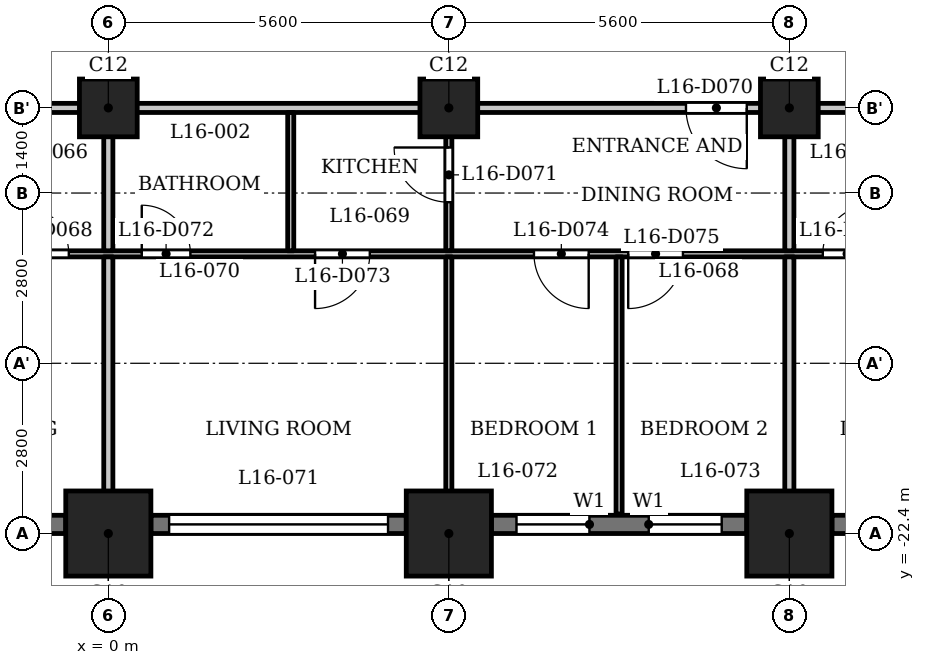
"""IFC4 building model, lengths in metres.
Left out: names, types, materials, properties, quantities, classifications, styles, units other than length and angle.
Written with IfcOpenShell. Run it as: python <this file> out.ifc"""

import sys

from ifc_helpers import new_model, si_unit, direction, frame, frame_2d, origin, origin_2d, place, context, subcontext, project, spatial, rectangle, extrude, element, fill, save


model = new_model("IFC4")
c1 = context("Model", 3, precision=1e-05, world=origin(), true_north=direction((0.0, 1.0)))
c2 = subcontext(c1, "Body", "Model", "MODEL_VIEW")
j1 = project(units=[si_unit("LENGTHUNIT", "METRE"), si_unit("PLANEANGLEUNIT", "RADIAN")], contexts=[c1])
p1 = place(None, origin())
s1 = spatial("IfcSite", under=j1, at=p1, CompositionType="ELEMENT")
p2 = place(p1, origin())
s2 = spatial("IfcBuilding", under=s1, at=p2, CompositionType="ELEMENT")
p3 = place(p2, frame((0.0, 0.0, 65.5)))
s3 = spatial("IfcBuildingStorey", under=s2, at=p3, CompositionType="ELEMENT", Elevation=65.5)
for number, where, z_axis, x_axis in (
    (1, (0.0, -22.4, 0.0), (0.0, 0.0, 1.0), (1.0, 0.0, 0.0)),
    (2, (5.6, -22.4, 0.0), (0.0, 0.0, 1.0), (1.0, 0.0, 0.0)),
    (3, (11.2, -22.4, 0.0), (0.0, 0.0, 1.0), (1.0, 0.0, 0.0)),
):
    element("IfcColumn", number, at=place(p3, frame(where, z_axis=z_axis, x_axis=x_axis)), inside=s3, PredefinedType="COLUMN", context=c2, shape_type="SweptSolid", body=[
        extrude(rectangle(XDim=1.4, YDim=1.4, at=origin_2d()), origin(), (0.0, 0.0, 1.0), 3.5),
    ])
for number, where, z_axis, x_axis in (
    (4, (0.0, -15.4, 0.0), (0.0, 0.0, 1.0), (1.0, 0.0, 0.0)),
    (5, (5.6, -15.4, 0.0), (0.0, 0.0, 1.0), (1.0, 0.0, 0.0)),
    (6, (11.2, -15.4, 0.0), (0.0, 0.0, 1.0), (1.0, 0.0, 0.0)),
):
    element("IfcColumn", number, at=place(p3, frame(where, z_axis=z_axis, x_axis=x_axis)), inside=s3, PredefinedType="COLUMN", context=c2, shape_type="SweptSolid", body=[
        extrude(rectangle(XDim=0.95, YDim=0.95, at=origin_2d()), origin(), (0.0, 0.0, 1.0), 3.5),
    ])
p4 = place(p3, frame((-4.9, -22.25, 0.0), z_axis=(0.0, 0.0, 1.0), x_axis=(1.0, 0.0, 0.0)))
e7 = element("IfcWall", 7, at=p4, inside=s3, PredefinedType="SOLIDWALL", context=c2, shape_type="SweptSolid", body=[
    extrude(rectangle(XDim=4.2, YDim=0.3, at=frame_2d((2.1, 0.0))), origin(), (0.0, 0.0, 1.0), 2.35),
])
p5 = place(p4, frame((0.3, 0.0, 1.2)))
e8 = element("IfcOpeningElement", 8, at=p5, cuts=e7, PredefinedType="OPENING", context=c2, shape_type="SweptSolid", body=[
    extrude(rectangle(XDim=3.6, YDim=0.95, at=frame_2d((1.8, 0.475))), frame((0.0, 0.16, 0.0), z_axis=(0.0, -1.0, 0.0), x_axis=(1.0, 0.0, 0.0)), (0.0, 0.0, 1.0), 0.32),
])
p6 = place(p3, frame((0.7, -22.25, 0.0), z_axis=(0.0, 0.0, 1.0), x_axis=(1.0, 0.0, 0.0)))
e9 = element("IfcWall", 9, at=p6, inside=s3, PredefinedType="SOLIDWALL", context=c2, shape_type="SweptSolid", body=[
    extrude(rectangle(XDim=4.2, YDim=0.3, at=frame_2d((2.1, 0.0))), origin(), (0.0, 0.0, 1.0), 2.35),
])
p7 = place(p6, frame((0.3, 0.0, 1.2)))
e10 = element("IfcOpeningElement", 10, at=p7, cuts=e9, PredefinedType="OPENING", context=c2, shape_type="SweptSolid", body=[
    extrude(rectangle(XDim=3.6, YDim=0.95, at=frame_2d((1.8, 0.475))), frame((0.0, 0.16, 0.0), z_axis=(0.0, -1.0, 0.0), x_axis=(1.0, 0.0, 0.0)), (0.0, 0.0, 1.0), 0.32),
])
p8 = place(p3, frame((6.3, -22.25, 0.0), z_axis=(0.0, 0.0, 1.0), x_axis=(1.0, 0.0, 0.0)))
e11 = element("IfcWall", 11, at=p8, inside=s3, PredefinedType="SOLIDWALL", context=c2, shape_type="SweptSolid", body=[
    extrude(rectangle(XDim=4.2, YDim=0.3, at=frame_2d((2.1, 0.0))), origin(), (0.0, 0.0, 1.0), 2.35),
])
p9 = place(p8, frame((0.413, 0.0, 0.6)))
e12 = element("IfcOpeningElement", 12, at=p9, cuts=e11, PredefinedType="OPENING", context=c2, shape_type="SweptSolid", body=[
    extrude(rectangle(XDim=1.2, YDim=1.55, at=frame_2d((0.6, 0.775))), frame((0.0, 0.16, 0.0), z_axis=(0.0, -1.0, 0.0), x_axis=(1.0, 0.0, 0.0)), (0.0, 0.0, 1.0), 0.32),
])
p10 = place(p8, frame((2.587, 0.0, 0.6)))
e13 = element("IfcOpeningElement", 13, at=p10, cuts=e11, PredefinedType="OPENING", context=c2, shape_type="SweptSolid", body=[
    extrude(rectangle(XDim=1.2, YDim=1.55, at=frame_2d((0.6, 0.775))), frame((0.0, 0.16, 0.0), z_axis=(0.0, -1.0, 0.0), x_axis=(1.0, 0.0, 0.0)), (0.0, 0.0, 1.0), 0.32),
])
p11 = place(p3, frame((11.9, -22.25, 0.0), z_axis=(0.0, 0.0, 1.0), x_axis=(1.0, 0.0, 0.0)))
e14 = element("IfcWall", 14, at=p11, inside=s3, PredefinedType="SOLIDWALL", context=c2, shape_type="SweptSolid", body=[
    extrude(rectangle(XDim=4.2, YDim=0.3, at=frame_2d((2.1, 0.0))), origin(), (0.0, 0.0, 1.0), 2.35),
])
p12 = place(p11, frame((0.3, 0.0, 1.2)))
e15 = element("IfcOpeningElement", 15, at=p12, cuts=e14, PredefinedType="OPENING", context=c2, shape_type="SweptSolid", body=[
    extrude(rectangle(XDim=3.6, YDim=0.95, at=frame_2d((1.8, 0.475))), frame((0.0, 0.16, 0.0), z_axis=(0.0, -1.0, 0.0), x_axis=(1.0, 0.0, 0.0)), (0.0, 0.0, 1.0), 0.32),
])
p13 = place(p3, frame((-26.394, -17.8, 0.0), z_axis=(0.0, 0.0, 1.0), x_axis=(1.0, 0.0, 0.0)))
e16 = element("IfcWall", 16, at=p13, inside=s3, PredefinedType="PARTITIONING", context=c2, shape_type="SweptSolid", body=[
    extrude(rectangle(XDim=53.034, YDim=0.1, at=frame_2d((26.517, 0.0))), origin(), (0.0, 0.0, 1.0), 3.2),
])
p14 = place(p13, frame((0.794, 0.0, 0.0)))
e17 = element("IfcOpeningElement", 17, at=p14, cuts=e16, PredefinedType="OPENING", context=c2, shape_type="SweptSolid", body=[
    extrude(rectangle(XDim=0.8, YDim=2.1, at=frame_2d((0.4, 1.05))), frame((0.0, 0.06, 0.0), z_axis=(0.0, -1.0, 0.0), x_axis=(1.0, 0.0, 0.0)), (0.0, 0.0, 1.0), 0.12),
])
p15 = place(p13, frame((5.644, 0.0, 0.0)))
e18 = element("IfcOpeningElement", 18, at=p15, cuts=e16, PredefinedType="OPENING", context=c2, shape_type="SweptSolid", body=[
    extrude(rectangle(XDim=0.9, YDim=2.1, at=frame_2d((0.45, 1.05))), frame((0.0, 0.06, 0.0), z_axis=(0.0, -1.0, 0.0), x_axis=(1.0, 0.0, 0.0)), (0.0, 0.0, 1.0), 0.12),
])
p16 = place(p13, frame((10.494, 0.0, 0.0)))
e19 = element("IfcOpeningElement", 19, at=p16, cuts=e16, PredefinedType="OPENING", context=c2, shape_type="SweptSolid", body=[
    extrude(rectangle(XDim=0.8, YDim=2.1, at=frame_2d((0.4, 1.05))), frame((0.0, 0.06, 0.0), z_axis=(0.0, -1.0, 0.0), x_axis=(1.0, 0.0, 0.0)), (0.0, 0.0, 1.0), 0.12),
])
p17 = place(p13, frame((13.844, 0.0, 0.0)))
e20 = element("IfcOpeningElement", 20, at=p17, cuts=e16, PredefinedType="OPENING", context=c2, shape_type="SweptSolid", body=[
    extrude(rectangle(XDim=0.9, YDim=2.1, at=frame_2d((0.45, 1.05))), frame((0.0, 0.06, 0.0), z_axis=(0.0, -1.0, 0.0), x_axis=(1.0, 0.0, 0.0)), (0.0, 0.0, 1.0), 0.12),
])
p18 = place(p13, frame((19.344, 0.0, 0.0)))
e21 = element("IfcOpeningElement", 21, at=p18, cuts=e16, PredefinedType="OPENING", context=c2, shape_type="SweptSolid", body=[
    extrude(rectangle(XDim=0.8, YDim=2.1, at=frame_2d((0.4, 1.05))), frame((0.0, 0.06, 0.0), z_axis=(0.0, -1.0, 0.0), x_axis=(1.0, 0.0, 0.0)), (0.0, 0.0, 1.0), 0.12),
])
p19 = place(p13, frame((16.094, 0.0, 0.0)))
e22 = element("IfcOpeningElement", 22, at=p19, cuts=e16, PredefinedType="OPENING", context=c2, shape_type="SweptSolid", body=[
    extrude(rectangle(XDim=0.9, YDim=2.1, at=frame_2d((0.45, 1.05))), frame((0.0, 0.06, 0.0), z_axis=(0.0, -1.0, 0.0), x_axis=(1.0, 0.0, 0.0)), (0.0, 0.0, 1.0), 0.12),
])
p20 = place(p13, frame((24.944, 0.0, 0.0)))
e23 = element("IfcOpeningElement", 23, at=p20, cuts=e16, PredefinedType="OPENING", context=c2, shape_type="SweptSolid", body=[
    extrude(rectangle(XDim=0.8, YDim=2.1, at=frame_2d((0.4, 1.05))), frame((0.0, 0.06, 0.0), z_axis=(0.0, -1.0, 0.0), x_axis=(1.0, 0.0, 0.0)), (0.0, 0.0, 1.0), 0.12),
])
p21 = place(p13, frame((22.444, 0.0, 0.0)))
e24 = element("IfcOpeningElement", 24, at=p21, cuts=e16, PredefinedType="OPENING", context=c2, shape_type="SweptSolid", body=[
    extrude(rectangle(XDim=0.9, YDim=2.1, at=frame_2d((0.45, 1.05))), frame((0.0, 0.06, 0.0), z_axis=(0.0, -1.0, 0.0), x_axis=(1.0, 0.0, 0.0)), (0.0, 0.0, 1.0), 0.12),
])
p22 = place(p13, frame((26.944, 0.0, 0.0)))
e25 = element("IfcOpeningElement", 25, at=p22, cuts=e16, PredefinedType="OPENING", context=c2, shape_type="SweptSolid", body=[
    extrude(rectangle(XDim=0.8, YDim=2.1, at=frame_2d((0.4, 1.05))), frame((0.0, 0.06, 0.0), z_axis=(0.0, -1.0, 0.0), x_axis=(1.0, 0.0, 0.0)), (0.0, 0.0, 1.0), 0.12),
])
p23 = place(p13, frame((29.794, 0.0, 0.0)))
e26 = element("IfcOpeningElement", 26, at=p23, cuts=e16, PredefinedType="OPENING", context=c2, shape_type="SweptSolid", body=[
    extrude(rectangle(XDim=0.9, YDim=2.1, at=frame_2d((0.45, 1.05))), frame((0.0, 0.06, 0.0), z_axis=(0.0, -1.0, 0.0), x_axis=(1.0, 0.0, 0.0)), (0.0, 0.0, 1.0), 0.12),
])
p24 = place(p13, frame((33.394, 0.0, 0.0)))
e27 = element("IfcOpeningElement", 27, at=p24, cuts=e16, PredefinedType="OPENING", context=c2, shape_type="SweptSolid", body=[
    extrude(rectangle(XDim=0.9, YDim=2.1, at=frame_2d((0.45, 1.05))), frame((0.0, 0.06, 0.0), z_axis=(0.0, -1.0, 0.0), x_axis=(1.0, 0.0, 0.0)), (0.0, 0.0, 1.0), 0.12),
])
p25 = place(p13, frame((34.944, 0.0, 0.0)))
e28 = element("IfcOpeningElement", 28, at=p25, cuts=e16, PredefinedType="OPENING", context=c2, shape_type="SweptSolid", body=[
    extrude(rectangle(XDim=0.9, YDim=2.1, at=frame_2d((0.45, 1.05))), frame((0.0, 0.06, 0.0), z_axis=(0.0, -1.0, 0.0), x_axis=(1.0, 0.0, 0.0)), (0.0, 0.0, 1.0), 0.12),
])
p26 = place(p13, frame((38.144, 0.0, 0.0)))
e29 = element("IfcOpeningElement", 29, at=p26, cuts=e16, PredefinedType="OPENING", context=c2, shape_type="SweptSolid", body=[
    extrude(rectangle(XDim=0.8, YDim=2.1, at=frame_2d((0.4, 1.05))), frame((0.0, 0.06, 0.0), z_axis=(0.0, -1.0, 0.0), x_axis=(1.0, 0.0, 0.0)), (0.0, 0.0, 1.0), 0.12),
])
p27 = place(p13, frame((40.244, 0.0, 0.0)))
e30 = element("IfcOpeningElement", 30, at=p27, cuts=e16, PredefinedType="OPENING", context=c2, shape_type="SweptSolid", body=[
    extrude(rectangle(XDim=0.9, YDim=2.1, at=frame_2d((0.45, 1.05))), frame((0.0, 0.06, 0.0), z_axis=(0.0, -1.0, 0.0), x_axis=(1.0, 0.0, 0.0)), (0.0, 0.0, 1.0), 0.12),
])
p28 = place(p13, frame((49.362, 0.0, 0.0)))
e31 = element("IfcOpeningElement", 31, at=p28, cuts=e16, PredefinedType="OPENING", context=c2, shape_type="SweptSolid", body=[
    extrude(rectangle(XDim=0.8, YDim=2.1, at=frame_2d((0.4, 1.05))), frame((0.0, 0.06, 0.0), z_axis=(0.0, -1.0, 0.0), x_axis=(1.0, 0.0, 0.0)), (0.0, 0.0, 1.0), 0.12),
])
p29 = place(p13, frame((45.094, 0.0, 0.0)))
e32 = element("IfcOpeningElement", 32, at=p29, cuts=e16, PredefinedType="OPENING", context=c2, shape_type="SweptSolid", body=[
    extrude(rectangle(XDim=0.9, YDim=2.1, at=frame_2d((0.45, 1.05))), frame((0.0, 0.06, 0.0), z_axis=(0.0, -1.0, 0.0), x_axis=(1.0, 0.0, 0.0)), (0.0, 0.0, 1.0), 0.12),
])
p30 = place(p3, frame((-27.484, -15.4, 0.0), z_axis=(0.0, 0.0, 1.0), x_axis=(1.0, 0.0, 0.0)))
e33 = element("IfcWall", 33, at=p30, inside=s3, PredefinedType="PARTITIONING", context=c2, shape_type="SweptSolid", body=[
    extrude(rectangle(XDim=54.968, YDim=0.15, at=frame_2d((27.484, 0.0))), origin(), (0.0, 0.0, 1.0), 3.2),
])
p31 = place(p30, frame((5.734, 0.0, 0.0)))
e34 = element("IfcOpeningElement", 34, at=p31, cuts=e33, PredefinedType="OPENING", context=c2, shape_type="SweptSolid", body=[
    extrude(rectangle(XDim=1.0, YDim=2.1, at=frame_2d((0.5, 1.05))), frame((0.0, 0.085, 0.0), z_axis=(0.0, -1.0, 0.0), x_axis=(1.0, 0.0, 0.0)), (0.0, 0.0, 1.0), 0.17),
])
p32 = place(p30, frame((13.934, 0.0, 0.0)))
e35 = element("IfcOpeningElement", 35, at=p32, cuts=e33, PredefinedType="OPENING", context=c2, shape_type="SweptSolid", body=[
    extrude(rectangle(XDim=1.0, YDim=2.1, at=frame_2d((0.5, 1.05))), frame((0.0, 0.085, 0.0), z_axis=(0.0, -1.0, 0.0), x_axis=(1.0, 0.0, 0.0)), (0.0, 0.0, 1.0), 0.17),
])
p33 = place(p30, frame((18.184, 0.0, 0.0)))
e36 = element("IfcOpeningElement", 36, at=p33, cuts=e33, PredefinedType="OPENING", context=c2, shape_type="SweptSolid", body=[
    extrude(rectangle(XDim=1.0, YDim=2.1, at=frame_2d((0.5, 1.05))), frame((0.0, 0.085, 0.0), z_axis=(0.0, -1.0, 0.0), x_axis=(1.0, 0.0, 0.0)), (0.0, 0.0, 1.0), 0.17),
])
p34 = place(p30, frame((22.534, 0.0, 0.0)))
e37 = element("IfcOpeningElement", 37, at=p34, cuts=e33, PredefinedType="OPENING", context=c2, shape_type="SweptSolid", body=[
    extrude(rectangle(XDim=1.0, YDim=2.1, at=frame_2d((0.5, 1.05))), frame((0.0, 0.085, 0.0), z_axis=(0.0, -1.0, 0.0), x_axis=(1.0, 0.0, 0.0)), (0.0, 0.0, 1.0), 0.17),
])
p35 = place(p30, frame((36.984, 0.0, 0.0)))
e38 = element("IfcOpeningElement", 38, at=p35, cuts=e33, PredefinedType="OPENING", context=c2, shape_type="SweptSolid", body=[
    extrude(rectangle(XDim=1.0, YDim=2.1, at=frame_2d((0.5, 1.05))), frame((0.0, 0.085, 0.0), z_axis=(0.0, -1.0, 0.0), x_axis=(1.0, 0.0, 0.0)), (0.0, 0.0, 1.0), 0.17),
])
p36 = place(p30, frame((42.334, 0.0, 0.0)))
e39 = element("IfcOpeningElement", 39, at=p36, cuts=e33, PredefinedType="OPENING", context=c2, shape_type="SweptSolid", body=[
    extrude(rectangle(XDim=1.0, YDim=2.1, at=frame_2d((0.5, 1.05))), frame((0.0, 0.085, 0.0), z_axis=(0.0, -1.0, 0.0), x_axis=(1.0, 0.0, 0.0)), (0.0, 0.0, 1.0), 0.17),
])
p37 = place(p30, frame((45.184, 0.0, 0.0)))
e40 = element("IfcOpeningElement", 40, at=p37, cuts=e33, PredefinedType="OPENING", context=c2, shape_type="SweptSolid", body=[
    extrude(rectangle(XDim=1.0, YDim=2.1, at=frame_2d((0.5, 1.05))), frame((0.0, 0.085, 0.0), z_axis=(0.0, -1.0, 0.0), x_axis=(1.0, 0.0, 0.0)), (0.0, 0.0, 1.0), 0.17),
])
p38 = place(p3, frame((0.0, -23.08, 0.0), z_axis=(0.0, 0.0, 1.0), x_axis=(0.0, 1.0, 0.0)))
e41 = element("IfcWall", 41, at=p38, inside=s3, PredefinedType="PARTITIONING", context=c2, shape_type="SweptSolid", body=[
    extrude(rectangle(XDim=5.23, YDim=0.15, at=frame_2d((2.615, 0.0))), origin(), (0.0, 0.0, 1.0), 3.2),
])
p39 = place(p3, frame((0.0, -17.75, 0.0), z_axis=(0.0, 0.0, 1.0), x_axis=(0.0, 1.0, 0.0)))
e42 = element("IfcWall", 42, at=p39, inside=s3, PredefinedType="PARTITIONING", context=c2, shape_type="SweptSolid", body=[
    extrude(rectangle(XDim=2.275, YDim=0.15, at=frame_2d((1.137, 0.0))), origin(), (0.0, 0.0, 1.0), 3.2),
])
p40 = place(p3, frame((3.0, -17.75, 0.0), z_axis=(0.0, 0.0, 1.0), x_axis=(0.0, 1.0, 0.0)))
e43 = element("IfcWall", 43, at=p40, inside=s3, PredefinedType="PARTITIONING", context=c2, shape_type="SweptSolid", body=[
    extrude(rectangle(XDim=2.275, YDim=0.1, at=frame_2d((1.137, 0.0))), origin(), (0.0, 0.0, 1.0), 3.2),
])
p41 = place(p3, frame((5.6, -23.08, 0.0), z_axis=(0.0, 0.0, 1.0), x_axis=(0.0, 1.0, 0.0)))
e44 = element("IfcWall", 44, at=p41, inside=s3, PredefinedType="PARTITIONING", context=c2, shape_type="SweptSolid", body=[
    extrude(rectangle(XDim=5.23, YDim=0.1, at=frame_2d((2.615, 0.0))), origin(), (0.0, 0.0, 1.0), 3.2),
])
p42 = place(p3, frame((5.6, -17.75, 0.0), z_axis=(0.0, 0.0, 1.0), x_axis=(0.0, 1.0, 0.0)))
e45 = element("IfcWall", 45, at=p42, inside=s3, PredefinedType="PARTITIONING", context=c2, shape_type="SweptSolid", body=[
    extrude(rectangle(XDim=2.275, YDim=0.1, at=frame_2d((1.137, 0.0))), origin(), (0.0, 0.0, 1.0), 3.2),
])
p43 = place(p42, frame((0.799, 0.0, 0.0)))
e46 = element("IfcOpeningElement", 46, at=p43, cuts=e45, PredefinedType="OPENING", context=c2, shape_type="SweptSolid", body=[
    extrude(rectangle(XDim=0.9, YDim=2.1, at=frame_2d((0.45, 1.05))), frame((0.0, 0.06, 0.0), z_axis=(0.0, -1.0, 0.0), x_axis=(1.0, 0.0, 0.0)), (0.0, 0.0, 1.0), 0.12),
])
p44 = place(p3, frame((8.4, -22.08, 0.0), z_axis=(0.0, 0.0, 1.0), x_axis=(0.0, 1.0, 0.0)))
e47 = element("IfcWall", 47, at=p44, inside=s3, PredefinedType="PARTITIONING", context=c2, shape_type="SweptSolid", body=[
    extrude(rectangle(XDim=4.23, YDim=0.1, at=frame_2d((2.115, 0.0))), origin(), (0.0, 0.0, 1.0), 3.2),
])
p45 = place(p3, frame((11.2, -23.08, 0.0), z_axis=(0.0, 0.0, 1.0), x_axis=(0.0, 1.0, 0.0)))
e48 = element("IfcWall", 48, at=p45, inside=s3, PredefinedType="PARTITIONING", context=c2, shape_type="SweptSolid", body=[
    extrude(rectangle(XDim=5.23, YDim=0.15, at=frame_2d((2.615, 0.0))), origin(), (0.0, 0.0, 1.0), 3.2),
])
p46 = place(p3, frame((11.2, -17.75, 0.0), z_axis=(0.0, 0.0, 1.0), x_axis=(0.0, 1.0, 0.0)))
e49 = element("IfcWall", 49, at=p46, inside=s3, PredefinedType="PARTITIONING", context=c2, shape_type="SweptSolid", body=[
    extrude(rectangle(XDim=2.275, YDim=0.15, at=frame_2d((1.137, 0.0))), origin(), (0.0, 0.0, 1.0), 3.2),
])
p47 = place(p20, origin())
e50 = element("IfcDoor", 50, at=p47, inside=s3, OperationType="SINGLE_SWING_RIGHT", PredefinedType="DOOR", context=c2, shape_type="SweptSolid", body=[
    extrude(rectangle(XDim=0.8, YDim=2.1, at=frame_2d((0.4, 1.05))), frame((0.0, 0.025, 0.0), z_axis=(0.0, -1.0, 0.0), x_axis=(1.0, 0.0, 0.0)), (0.0, 0.0, 1.0), 0.05),
])
fill(e23, e50)
p48 = place(p35, origin())
e51 = element("IfcDoor", 51, at=p48, inside=s3, OperationType="SINGLE_SWING_RIGHT", PredefinedType="DOOR", context=c2, shape_type="SweptSolid", body=[
    extrude(rectangle(XDim=1.0, YDim=2.1, at=frame_2d((0.5, 1.05))), frame((0.0, 0.025, 0.0), z_axis=(0.0, -1.0, 0.0), x_axis=(1.0, 0.0, 0.0)), (0.0, 0.0, 1.0), 0.05),
])
fill(e38, e51)
p49 = place(p43, origin())
e52 = element("IfcDoor", 52, at=p49, inside=s3, OperationType="SINGLE_SWING_LEFT", PredefinedType="DOOR", context=c2, shape_type="SweptSolid", body=[
    extrude(rectangle(XDim=0.9, YDim=2.1, at=frame_2d((0.45, 1.05))), frame((0.0, 0.025, 0.0), z_axis=(0.0, -1.0, 0.0), x_axis=(1.0, 0.0, 0.0)), (0.0, 0.0, 1.0), 0.05),
])
fill(e46, e52)
p50 = place(p22, origin())
e53 = element("IfcDoor", 53, at=p50, inside=s3, OperationType="SINGLE_SWING_RIGHT", PredefinedType="DOOR", context=c2, shape_type="SweptSolid", body=[
    extrude(rectangle(XDim=0.8, YDim=2.1, at=frame_2d((0.4, 1.05))), frame((0.0, 0.025, 0.0), z_axis=(0.0, -1.0, 0.0), x_axis=(1.0, 0.0, 0.0)), (0.0, 0.0, 1.0), 0.05),
])
fill(e25, e53)
p51 = place(p23, origin())
e54 = element("IfcDoor", 54, at=p51, inside=s3, OperationType="SINGLE_SWING_LEFT", PredefinedType="DOOR", context=c2, shape_type="SweptSolid", body=[
    extrude(rectangle(XDim=0.9, YDim=2.1, at=frame_2d((0.45, 1.05))), frame((0.0, 0.025, 0.0), z_axis=(0.0, -1.0, 0.0), x_axis=(1.0, 0.0, 0.0)), (0.0, 0.0, 1.0), 0.05),
])
fill(e26, e54)
p52 = place(p24, origin())
e55 = element("IfcDoor", 55, at=p52, inside=s3, OperationType="SINGLE_SWING_RIGHT", PredefinedType="DOOR", context=c2, shape_type="SweptSolid", body=[
    extrude(rectangle(XDim=0.9, YDim=2.1, at=frame_2d((0.45, 1.05))), frame((0.0, 0.025, 0.0), z_axis=(0.0, -1.0, 0.0), x_axis=(1.0, 0.0, 0.0)), (0.0, 0.0, 1.0), 0.05),
])
fill(e27, e55)
p53 = place(p25, origin())
e56 = element("IfcDoor", 56, at=p53, inside=s3, OperationType="SINGLE_SWING_LEFT", PredefinedType="DOOR", context=c2, shape_type="SweptSolid", body=[
    extrude(rectangle(XDim=0.9, YDim=2.1, at=frame_2d((0.45, 1.05))), frame((0.0, 0.025, 0.0), z_axis=(0.0, -1.0, 0.0), x_axis=(1.0, 0.0, 0.0)), (0.0, 0.0, 1.0), 0.05),
])
fill(e28, e56)
p54 = place(p26, origin())
e57 = element("IfcDoor", 57, at=p54, inside=s3, OperationType="SINGLE_SWING_LEFT", PredefinedType="DOOR", context=c2, shape_type="SweptSolid", body=[
    extrude(rectangle(XDim=0.8, YDim=2.1, at=frame_2d((0.4, 1.05))), frame((0.0, 0.025, 0.0), z_axis=(0.0, -1.0, 0.0), x_axis=(1.0, 0.0, 0.0)), (0.0, 0.0, 1.0), 0.05),
])
fill(e29, e57)
p55 = place(p7, origin())
e58 = element("IfcWindow", 58, at=p55, inside=s3, PartitioningType="SINGLE_PANEL", PredefinedType="WINDOW", context=c2, shape_type="SweptSolid", body=[
    extrude(rectangle(XDim=3.6, YDim=0.95, at=frame_2d((1.8, 0.475))), frame((0.0, 0.03, 0.0), z_axis=(0.0, -1.0, 0.0), x_axis=(1.0, 0.0, 0.0)), (0.0, 0.0, 1.0), 0.06),
])
fill(e10, e58)
p56 = place(p9, origin())
e59 = element("IfcWindow", 59, at=p56, inside=s3, PartitioningType="SINGLE_PANEL", PredefinedType="WINDOW", context=c2, shape_type="SweptSolid", body=[
    extrude(rectangle(XDim=1.2, YDim=1.55, at=frame_2d((0.6, 0.775))), frame((0.0, 0.03, 0.0), z_axis=(0.0, -1.0, 0.0), x_axis=(1.0, 0.0, 0.0)), (0.0, 0.0, 1.0), 0.06),
])
fill(e12, e59)
p57 = place(p10, origin())
e60 = element("IfcWindow", 60, at=p57, inside=s3, PartitioningType="SINGLE_PANEL", PredefinedType="WINDOW", context=c2, shape_type="SweptSolid", body=[
    extrude(rectangle(XDim=1.2, YDim=1.55, at=frame_2d((0.6, 0.775))), frame((0.0, 0.03, 0.0), z_axis=(0.0, -1.0, 0.0), x_axis=(1.0, 0.0, 0.0)), (0.0, 0.0, 1.0), 0.06),
])
fill(e13, e60)
save(model, sys.argv[1])
